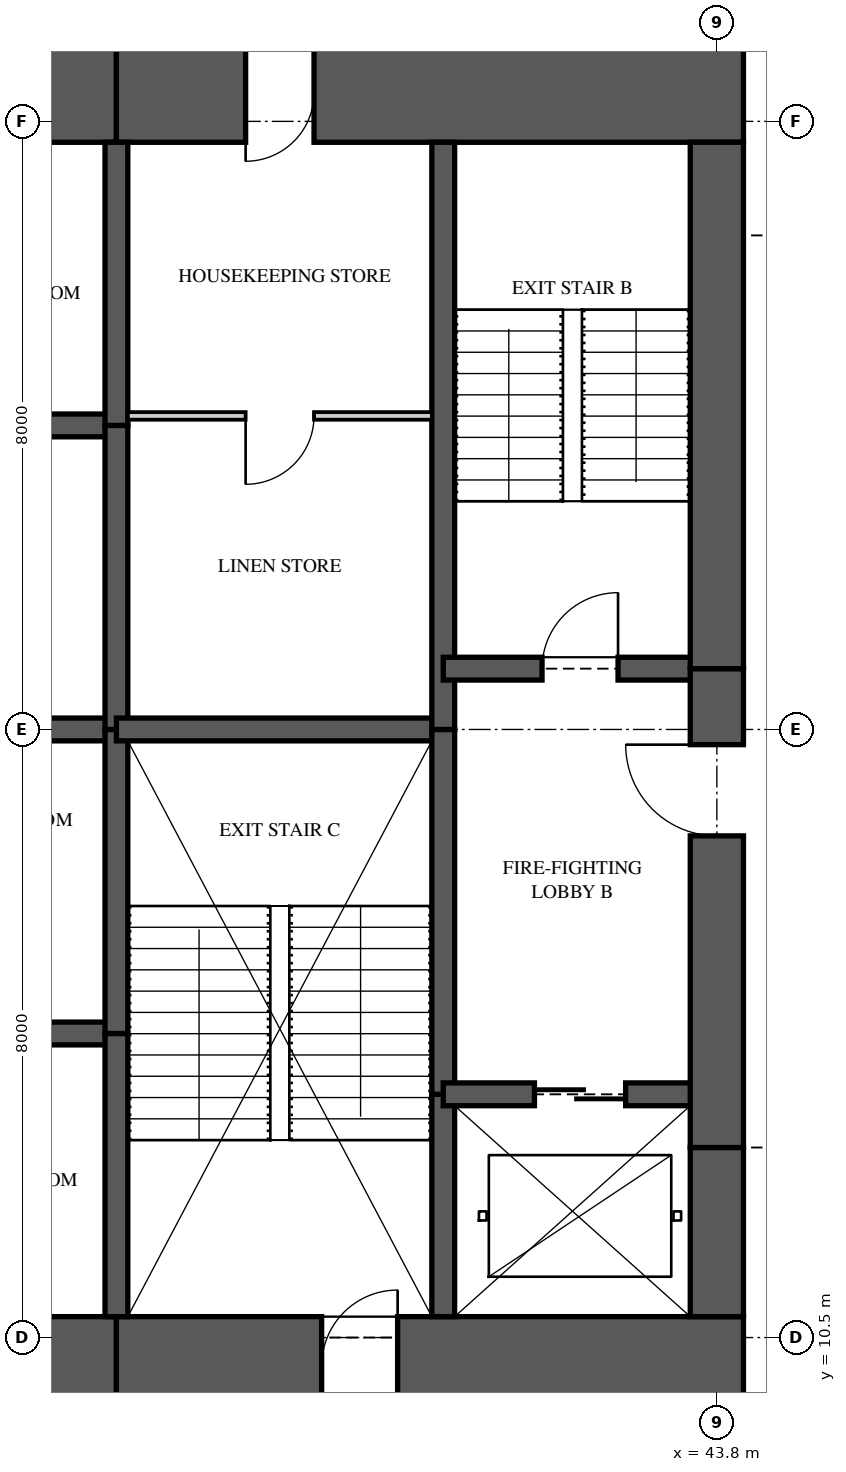
"""IFC4 building model, lengths in metres.
Left out: names, types, materials, properties, quantities, classifications, styles, units other than length and angle.
Written with IfcOpenShell. Run it as: python <this file> out.ifc"""

import sys

from ifc_helpers import new_model, si_unit, direction, frame, frame_2d, origin, place, context, subcontext, project, spatial, rectangle, extrude, element, fill, save


model = new_model("IFC4")
c1 = context("Model", 3, precision=1e-05, world=origin(), true_north=direction((0.0, 1.0)))
c2 = subcontext(c1, "Body", "Model", "MODEL_VIEW")
j1 = project(units=[si_unit("LENGTHUNIT", "METRE"), si_unit("PLANEANGLEUNIT", "RADIAN")], contexts=[c1])
p1 = place(None, origin())
s1 = spatial("IfcSite", under=j1, at=p1, CompositionType="ELEMENT")
p2 = place(p1, origin())
s2 = spatial("IfcBuilding", under=s1, at=p2, CompositionType="ELEMENT")
p3 = place(p2, frame((0.0, 0.0, 187.85)))
s3 = spatial("IfcBuildingStorey", under=s2, at=p3, CompositionType="ELEMENT", Elevation=187.85)
p4 = place(p3, frame((31.6, 10.125, 0.0), z_axis=(0.0, 0.0, 1.0), x_axis=(1.0, 0.0, 0.0)))
e1 = element("IfcWall", 1, at=p4, inside=s3, PredefinedType="SHEAR", context=c2, shape_type="SweptSolid", body=[
    extrude(rectangle(XDim=4.3, YDim=1.3, at=frame_2d((2.15, 0.0))), origin(), (0.0, 0.0, 1.0), 3.35),
])
p5 = place(p3, frame((35.9, 10.125, 0.0), z_axis=(0.0, 0.0, 1.0), x_axis=(1.0, 0.0, 0.0)))
e2 = element("IfcWall", 2, at=p5, inside=s3, PredefinedType="SHEAR", context=c2, shape_type="SweptSolid", body=[
    extrude(rectangle(XDim=8.25, YDim=1.3, at=frame_2d((4.125, 0.0))), origin(), (0.0, 0.0, 1.0), 3.35),
])
p6 = place(p5, frame((2.7, 0.0, 0.0)))
e3 = element("IfcOpeningElement", 3, at=p6, cuts=e2, PredefinedType="OPENING", context=c2, shape_type="SweptSolid", body=[
    extrude(rectangle(XDim=1.0, YDim=2.1, at=frame_2d((0.5, 1.05))), frame((0.0, 0.66, 0.0), z_axis=(0.0, -1.0, 0.0), x_axis=(1.0, 0.0, 0.0)), (0.0, 0.0, 1.0), 1.32),
])
p7 = place(p3, frame((44.15, 26.875, 0.0), z_axis=(0.0, 0.0, 1.0), x_axis=(-1.0, 0.0, 0.0)))
e4 = element("IfcWall", 4, at=p7, inside=s3, PredefinedType="SHEAR", context=c2, shape_type="SweptSolid", body=[
    extrude(rectangle(XDim=8.25, YDim=1.3, at=frame_2d((4.125, 0.0))), origin(), (0.0, 0.0, 1.0), 3.35),
])
p8 = place(p7, frame((5.65, 0.0, 0.0)))
e5 = element("IfcOpeningElement", 5, at=p8, cuts=e4, PredefinedType="OPENING", context=c2, shape_type="SweptSolid", body=[
    extrude(rectangle(XDim=0.9, YDim=2.1, at=frame_2d((0.45, 1.05))), frame((0.0, 0.66, 0.0), z_axis=(0.0, -1.0, 0.0), x_axis=(1.0, 0.0, 0.0)), (0.0, 0.0, 1.0), 1.32),
])
p9 = place(p3, frame((35.9, 26.875, 0.0), z_axis=(0.0, 0.0, 1.0), x_axis=(-1.0, 0.0, 0.0)))
e6 = element("IfcWall", 6, at=p9, inside=s3, PredefinedType="SHEAR", context=c2, shape_type="SweptSolid", body=[
    extrude(rectangle(XDim=4.3, YDim=1.3, at=frame_2d((2.15, 0.0))), origin(), (0.0, 0.0, 1.0), 3.35),
])
p10 = place(p3, frame((43.8, 10.775, 0.0), z_axis=(0.0, 0.0, 1.0), x_axis=(0.0, 1.0, 0.0)))
e7 = element("IfcWall", 7, at=p10, inside=s3, PredefinedType="SHEAR", context=c2, shape_type="SweptSolid", body=[
    extrude(rectangle(XDim=2.225, YDim=0.7, at=frame_2d((1.113, 0.0))), origin(), (0.0, 0.0, 1.0), 3.35),
])
p11 = place(p3, frame((43.8, 13.0, 0.0), z_axis=(0.0, 0.0, 1.0), x_axis=(0.0, 1.0, 0.0)))
e8 = element("IfcWall", 8, at=p11, inside=s3, PredefinedType="SHEAR", context=c2, shape_type="SweptSolid", body=[
    extrude(rectangle(XDim=6.3, YDim=0.7, at=frame_2d((3.15, 0.0))), origin(), (0.0, 0.0, 1.0), 3.35),
])
p12 = place(p11, frame((4.1, 0.0, 0.0)))
e9 = element("IfcOpeningElement", 9, at=p12, cuts=e8, PredefinedType="OPENING", context=c2, shape_type="SweptSolid", body=[
    extrude(rectangle(XDim=1.2, YDim=2.2, at=frame_2d((0.6, 1.1))), frame((0.0, 0.36, 0.0), z_axis=(0.0, -1.0, 0.0), x_axis=(1.0, 0.0, 0.0)), (0.0, 0.0, 1.0), 0.72),
])
p13 = place(p3, frame((43.8, 19.3, 0.0), z_axis=(0.0, 0.0, 1.0), x_axis=(0.0, 1.0, 0.0)))
e10 = element("IfcWall", 10, at=p13, inside=s3, PredefinedType="SHEAR", context=c2, shape_type="SweptSolid", body=[
    extrude(rectangle(XDim=6.925, YDim=0.7, at=frame_2d((3.462, 0.0))), origin(), (0.0, 0.0, 1.0), 3.35),
])
p14 = place(p3, frame((35.9, 10.775, 0.0), z_axis=(0.0, 0.0, 1.0), x_axis=(0.0, 1.0, 0.0)))
e11 = element("IfcWall", 11, at=p14, inside=s3, PredefinedType="SHEAR", context=c2, shape_type="SweptSolid", body=[
    extrude(rectangle(XDim=3.725, YDim=0.3, at=frame_2d((1.863, 0.0))), origin(), (0.0, 0.0, 1.0), 3.35),
])
for number, where, z_axis, x_axis in (
    (12, (35.9, 14.5, 0.0), (0.0, 0.0, 1.0), (0.0, 1.0, 0.0)),
    (13, (35.9, 18.5, 0.0), (0.0, 0.0, 1.0), (0.0, 1.0, 0.0)),
):
    element("IfcWall", number, at=place(p3, frame(where, z_axis=z_axis, x_axis=x_axis)), inside=s3, PredefinedType="SHEAR", context=c2, shape_type="SweptSolid", body=[
        extrude(rectangle(XDim=4.0, YDim=0.3, at=frame_2d((2.0, 0.0))), origin(), (0.0, 0.0, 1.0), 3.35),
    ])
p15 = place(p3, frame((35.9, 22.5, 0.0), z_axis=(0.0, 0.0, 1.0), x_axis=(0.0, 1.0, 0.0)))
e14 = element("IfcWall", 14, at=p15, inside=s3, PredefinedType="SHEAR", context=c2, shape_type="SweptSolid", body=[
    extrude(rectangle(XDim=3.725, YDim=0.3, at=frame_2d((1.863, 0.0))), origin(), (0.0, 0.0, 1.0), 3.35),
])
p16 = place(p3, frame((40.2, 10.775, 0.0), z_axis=(0.0, 0.0, 1.0), x_axis=(0.0, 1.0, 0.0)))
e15 = element("IfcWall", 15, at=p16, inside=s3, PredefinedType="SHEAR", context=c2, shape_type="SweptSolid", body=[
    extrude(rectangle(XDim=2.925, YDim=0.3, at=frame_2d((1.462, 0.0))), origin(), (0.0, 0.0, 1.0), 3.35),
])
p17 = place(p3, frame((40.2, 13.7, 0.0), z_axis=(0.0, 0.0, 1.0), x_axis=(0.0, 1.0, 0.0)))
e16 = element("IfcWall", 16, at=p17, inside=s3, PredefinedType="SHEAR", context=c2, shape_type="SweptSolid", body=[
    extrude(rectangle(XDim=4.8, YDim=0.3, at=frame_2d((2.4, 0.0))), origin(), (0.0, 0.0, 1.0), 3.35),
])
p18 = place(p3, frame((40.2, 18.5, 0.0), z_axis=(0.0, 0.0, 1.0), x_axis=(0.0, 1.0, 0.0)))
e17 = element("IfcWall", 17, at=p18, inside=s3, PredefinedType="SHEAR", context=c2, shape_type="SweptSolid", body=[
    extrude(rectangle(XDim=7.725, YDim=0.3, at=frame_2d((3.863, 0.0))), origin(), (0.0, 0.0, 1.0), 3.35),
])
for number, where, z_axis, x_axis in (
    (18, (31.6, 14.5, 0.0), (0.0, 0.0, 1.0), (1.0, 0.0, 0.0)),
    (19, (31.6, 18.5, 0.0), (0.0, 0.0, 1.0), (1.0, 0.0, 0.0)),
    (20, (31.6, 22.5, 0.0), (0.0, 0.0, 1.0), (1.0, 0.0, 0.0)),
):
    element("IfcWall", number, at=place(p3, frame(where, z_axis=z_axis, x_axis=x_axis)), inside=s3, PredefinedType="SHEAR", context=c2, shape_type="SweptSolid", body=[
        extrude(rectangle(XDim=4.3, YDim=0.3, at=frame_2d((2.15, 0.0))), origin(), (0.0, 0.0, 1.0), 3.35),
    ])
p19 = place(p3, frame((35.9, 18.5, 0.0), z_axis=(0.0, 0.0, 1.0), x_axis=(1.0, 0.0, 0.0)))
e21 = element("IfcWall", 21, at=p19, inside=s3, PredefinedType="SHEAR", context=c2, shape_type="SweptSolid", body=[
    extrude(rectangle(XDim=4.3, YDim=0.3, at=frame_2d((2.15, 0.0))), origin(), (0.0, 0.0, 1.0), 3.35),
])
p20 = place(p3, frame((40.2, 13.7, 0.0), z_axis=(0.0, 0.0, 1.0), x_axis=(1.0, 0.0, 0.0)))
e22 = element("IfcWall", 22, at=p20, inside=s3, PredefinedType="SHEAR", context=c2, shape_type="SweptSolid", body=[
    extrude(rectangle(XDim=3.6, YDim=0.3, at=frame_2d((1.8, 0.0))), origin(), (0.0, 0.0, 1.0), 3.35),
])
p21 = place(p20, frame((1.2, 0.0, 0.0)))
e23 = element("IfcOpeningElement", 23, at=p21, cuts=e22, PredefinedType="OPENING", context=c2, shape_type="SweptSolid", body=[
    extrude(rectangle(XDim=1.2, YDim=2.1, at=frame_2d((0.6, 1.05))), frame((0.0, 0.16, 0.0), z_axis=(0.0, -1.0, 0.0), x_axis=(1.0, 0.0, 0.0)), (0.0, 0.0, 1.0), 0.32),
])
p22 = place(p3, frame((40.2, 19.3, 0.0), z_axis=(0.0, 0.0, 1.0), x_axis=(1.0, 0.0, 0.0)))
e24 = element("IfcWall", 24, at=p22, inside=s3, PredefinedType="SHEAR", context=c2, shape_type="SweptSolid", body=[
    extrude(rectangle(XDim=3.6, YDim=0.3, at=frame_2d((1.8, 0.0))), origin(), (0.0, 0.0, 1.0), 3.35),
])
p23 = place(p22, frame((1.3, 0.0, 0.0)))
e25 = element("IfcOpeningElement", 25, at=p23, cuts=e24, PredefinedType="OPENING", context=c2, shape_type="SweptSolid", body=[
    extrude(rectangle(XDim=1.0, YDim=2.1, at=frame_2d((0.5, 1.05))), frame((0.0, 0.16, 0.0), z_axis=(0.0, -1.0, 0.0), x_axis=(1.0, 0.0, 0.0)), (0.0, 0.0, 1.0), 0.32),
])
p24 = place(p3, frame((36.05, 22.625, 0.0), z_axis=(0.0, 0.0, 1.0), x_axis=(1.0, 0.0, 0.0)))
e26 = element("IfcWall", 26, at=p24, inside=s3, PredefinedType="PARTITIONING", context=c2, shape_type="SweptSolid", body=[
    extrude(rectangle(XDim=4.0, YDim=0.1, at=frame_2d((2.0, 0.0))), origin(), (0.0, 0.0, 1.0), 3.11),
])
p25 = place(p24, frame((1.55, 0.0, 0.0)))
e27 = element("IfcOpeningElement", 27, at=p25, cuts=e26, PredefinedType="OPENING", context=c2, shape_type="SweptSolid", body=[
    extrude(rectangle(XDim=0.9, YDim=2.1, at=frame_2d((0.45, 1.05))), frame((0.0, 0.06, 0.0), z_axis=(0.0, -1.0, 0.0), x_axis=(1.0, 0.0, 0.0)), (0.0, 0.0, 1.0), 0.12),
])
p26 = place(p25, frame((0.9, 0.0, 0.0), z_axis=(0.0, 0.0, 1.0), x_axis=(-1.0, 0.0, 0.0)))
e28 = element("IfcDoor", 28, at=p26, inside=s3, OperationType="SINGLE_SWING_RIGHT", PredefinedType="DOOR", context=c2, shape_type="SweptSolid", body=[
    extrude(rectangle(XDim=0.9, YDim=2.1, at=frame_2d((0.45, 1.05))), frame((0.0, 0.025, 0.0), z_axis=(0.0, -1.0, 0.0), x_axis=(1.0, 0.0, 0.0)), (0.0, 0.0, 1.0), 0.05),
])
fill(e27, e28)
p27 = place(p23, origin())
e29 = element("IfcDoor", 29, at=p27, inside=s3, OperationType="SINGLE_SWING_RIGHT", PredefinedType="DOOR", context=c2, shape_type="SweptSolid", body=[
    extrude(rectangle(XDim=1.0, YDim=2.1, at=frame_2d((0.5, 1.05))), frame((0.0, 0.025, 0.0), z_axis=(0.0, -1.0, 0.0), x_axis=(1.0, 0.0, 0.0)), (0.0, 0.0, 1.0), 0.05),
])
fill(e25, e29)
p28 = place(p12, origin())
e30 = element("IfcDoor", 30, at=p28, inside=s3, OperationType="SINGLE_SWING_RIGHT", PredefinedType="DOOR", context=c2, shape_type="SweptSolid", body=[
    extrude(rectangle(XDim=1.2, YDim=2.2, at=frame_2d((0.6, 1.1))), frame((0.0, 0.025, 0.0), z_axis=(0.0, -1.0, 0.0), x_axis=(1.0, 0.0, 0.0)), (0.0, 0.0, 1.0), 0.05),
])
fill(e9, e30)
p29 = place(p21, origin())
e31 = element("IfcDoor", 31, at=p29, inside=s3, OperationType="SLIDING_TO_LEFT", PredefinedType="DOOR", context=c2, shape_type="SweptSolid", body=[
    extrude(rectangle(XDim=1.2, YDim=2.1, at=frame_2d((0.6, 1.05))), frame((0.0, 0.025, 0.0), z_axis=(0.0, -1.0, 0.0), x_axis=(1.0, 0.0, 0.0)), (0.0, 0.0, 1.0), 0.05),
])
fill(e23, e31)
p30 = place(p6, origin())
e32 = element("IfcDoor", 32, at=p30, inside=s3, OperationType="SINGLE_SWING_RIGHT", PredefinedType="DOOR", context=c2, shape_type="SweptSolid", body=[
    extrude(rectangle(XDim=1.0, YDim=2.1, at=frame_2d((0.5, 1.05))), frame((0.0, 0.025, 0.0), z_axis=(0.0, -1.0, 0.0), x_axis=(1.0, 0.0, 0.0)), (0.0, 0.0, 1.0), 0.05),
])
fill(e3, e32)
p31 = place(p8, origin())
e33 = element("IfcDoor", 33, at=p31, inside=s3, OperationType="SINGLE_SWING_RIGHT", PredefinedType="DOOR", context=c2, shape_type="SweptSolid", body=[
    extrude(rectangle(XDim=0.9, YDim=2.1, at=frame_2d((0.45, 1.05))), frame((0.0, 0.47, 0.0), z_axis=(0.0, -1.0, 0.0), x_axis=(1.0, 0.0, 0.0)), (0.0, 0.0, 1.0), 0.8),
])
fill(e5, e33)
save(model, sys.argv[1])
